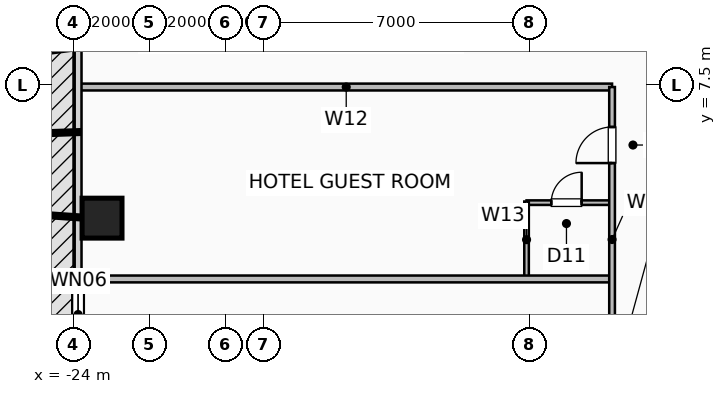
"""IFC4 building model, lengths in metres.
Left out: names, types, materials, properties, quantities, classifications, styles, units other than length and angle.
Written with IfcOpenShell. Run it as: python <this file> out.ifc"""

import sys

from ifc_helpers import new_model, si_unit, direction, frame, frame_2d, origin, origin_2d, place, context, subcontext, project, spatial, rectangle, hollow_rectangle, extrude, element, fill, save


model = new_model("IFC4")
c1 = context("Model", 3, precision=1e-05, world=origin(), true_north=direction((0.0, 1.0)))
c2 = subcontext(c1, "Body", "Model", "MODEL_VIEW")
j1 = project(units=[si_unit("LENGTHUNIT", "METRE"), si_unit("PLANEANGLEUNIT", "RADIAN")], contexts=[c1])
p1 = place(None, origin())
s1 = spatial("IfcSite", under=j1, at=p1, CompositionType="ELEMENT")
p2 = place(p1, origin())
s2 = spatial("IfcBuilding", under=s1, at=p2, CompositionType="ELEMENT")
p3 = place(p2, frame((0.0, 0.0, 27.0)))
s3 = spatial("IfcBuildingStorey", under=s2, at=p3, CompositionType="ELEMENT", Elevation=27.0)
p4 = place(p3, frame((-23.25, 4.0, 0.0), z_axis=(0.0, 0.0, 1.0), x_axis=(1.0, 0.0, 0.0)))
e1 = element("IfcColumn", 1, at=p4, inside=s3, PredefinedType="COLUMN", context=c2, shape_type="SweptSolid", body=[
    extrude(hollow_rectangle(XDim=1.05, YDim=1.05, WallThickness=0.05, at=origin_2d()), origin(), (0.0, 0.0, 1.0), 3.5),
])
p5 = place(p3, frame((-23.88, -2.4, 0.0), z_axis=(0.0, 0.0, 1.0), x_axis=(0.0, 1.0, 0.0)))
e2 = element("IfcWall", 2, at=p5, inside=s3, PredefinedType="SOLIDWALL", context=c2, shape_type="SweptSolid", body=[
    extrude(rectangle(XDim=4.8, YDim=0.3, at=frame_2d((2.4, 0.0))), origin(), (0.0, 0.0, 1.0), 3.25),
])
p6 = place(p5, frame((1.85, 0.0, 0.0)))
e3 = element("IfcOpeningElement", 3, at=p6, cuts=e2, PredefinedType="OPENING", context=c2, shape_type="SweptSolid", body=[
    extrude(rectangle(XDim=1.1, YDim=2.2, at=frame_2d((0.55, 1.1))), frame((0.0, 0.16, 0.0), z_axis=(0.0, -1.0, 0.0), x_axis=(1.0, 0.0, 0.0)), (0.0, 0.0, 1.0), 0.32),
])
p7 = place(p5, frame((0.22, 0.0, 0.85)))
e4 = element("IfcOpeningElement", 4, at=p7, cuts=e2, PredefinedType="OPENING", context=c2, shape_type="SweptSolid", body=[
    extrude(rectangle(XDim=1.43, YDim=1.8, at=frame_2d((0.715, 0.9))), frame((0.0, 0.16, 0.0), z_axis=(0.0, -1.0, 0.0), x_axis=(1.0, 0.0, 0.0)), (0.0, 0.0, 1.0), 0.32),
])
p8 = place(p5, frame((3.15, 0.0, 0.85)))
e5 = element("IfcOpeningElement", 5, at=p8, cuts=e2, PredefinedType="OPENING", context=c2, shape_type="SweptSolid", body=[
    extrude(rectangle(XDim=1.43, YDim=1.8, at=frame_2d((0.715, 0.9))), frame((0.0, 0.16, 0.0), z_axis=(0.0, -1.0, 0.0), x_axis=(1.0, 0.0, 0.0)), (0.0, 0.0, 1.0), 0.32),
])
p9 = place(p3, frame((-12.08, 4.408, 0.0), z_axis=(0.0, 0.0, 1.0), x_axis=(1.0, 0.0, 0.0)))
e6 = element("IfcWall", 6, at=p9, inside=s3, PredefinedType="PLUMBINGWALL", context=c2, shape_type="SweptSolid", body=[
    extrude(rectangle(XDim=2.25, YDim=0.12, at=frame_2d((1.125, 0.0))), origin(), (0.0, 0.0, 1.0), 3.25),
])
p10 = place(p9, frame((0.65, 0.0, 0.0)))
e7 = element("IfcOpeningElement", 7, at=p10, cuts=e6, PredefinedType="OPENING", context=c2, shape_type="SweptSolid", body=[
    extrude(rectangle(XDim=0.8, YDim=2.05, at=frame_2d((0.4, 1.025))), frame((0.0, 0.07, 0.0), z_axis=(0.0, -1.0, 0.0), x_axis=(1.0, 0.0, 0.0)), (0.0, 0.0, 1.0), 0.14),
])
p11 = place(p3, frame((-12.08, 2.43, 0.0), z_axis=(0.0, 0.0, 1.0), x_axis=(0.0, 1.0, 0.0)))
e8 = element("IfcWall", 8, at=p11, inside=s3, PredefinedType="PLUMBINGWALL", context=c2, shape_type="SweptSolid", body=[
    extrude(rectangle(XDim=2.008, YDim=0.12, at=frame_2d((1.004, 0.0))), origin(), (0.0, 0.0, 1.0), 3.25),
])
for number, where, z_axis, x_axis in (
    (9, (-23.82, 2.4, 0.0), (0.0, 0.0, 1.0), (1.0, 0.0, 0.0)),
    (10, (-23.82, 7.45, 0.0), (0.0, 0.0, 1.0), (1.0, 0.0, 0.0)),
):
    element("IfcWall", number, at=place(p3, frame(where, z_axis=z_axis, x_axis=x_axis)), inside=s3, PredefinedType="PARTITIONING", context=c2, shape_type="SweptSolid", body=[
        extrude(rectangle(XDim=13.99, YDim=0.18, at=frame_2d((6.995, 0.0))), origin(), (0.0, 0.0, 1.0), 3.25),
    ])
p12 = place(p3, frame((-9.83, -7.45, 0.0), z_axis=(0.0, 0.0, 1.0), x_axis=(0.0, 1.0, 0.0)))
e11 = element("IfcWall", 11, at=p12, inside=s3, PredefinedType="PARTITIONING", context=c2, shape_type="SweptSolid", body=[
    extrude(rectangle(XDim=14.9, YDim=0.15, at=frame_2d((7.45, 0.0))), origin(), (0.0, 0.0, 1.0), 3.25),
])
p13 = place(p12, frame((3.049, 0.0, 0.0)))
e12 = element("IfcOpeningElement", 12, at=p13, cuts=e11, PredefinedType="OPENING", context=c2, shape_type="SweptSolid", body=[
    extrude(rectangle(XDim=0.95, YDim=2.08, at=frame_2d((0.475, 1.04))), frame((0.0, 0.085, 0.0), z_axis=(0.0, -1.0, 0.0), x_axis=(1.0, 0.0, 0.0)), (0.0, 0.0, 1.0), 0.17),
])
p14 = place(p12, frame((7.927, 0.0, 0.0)))
e13 = element("IfcOpeningElement", 13, at=p14, cuts=e11, PredefinedType="OPENING", context=c2, shape_type="SweptSolid", body=[
    extrude(rectangle(XDim=0.95, YDim=2.08, at=frame_2d((0.475, 1.04))), frame((0.0, 0.085, 0.0), z_axis=(0.0, -1.0, 0.0), x_axis=(1.0, 0.0, 0.0)), (0.0, 0.0, 1.0), 0.17),
])
p15 = place(p12, frame((12.899, 0.0, 0.0)))
e14 = element("IfcOpeningElement", 14, at=p15, cuts=e11, PredefinedType="OPENING", context=c2, shape_type="SweptSolid", body=[
    extrude(rectangle(XDim=0.95, YDim=2.08, at=frame_2d((0.475, 1.04))), frame((0.0, 0.085, 0.0), z_axis=(0.0, -1.0, 0.0), x_axis=(1.0, 0.0, 0.0)), (0.0, 0.0, 1.0), 0.17),
])
p16 = place(p8, origin())
e15 = element("IfcWindow", 15, at=p16, inside=s3, PartitioningType="SINGLE_PANEL", PredefinedType="WINDOW", context=c2, shape_type="SweptSolid", body=[
    extrude(rectangle(XDim=1.43, YDim=1.8, at=frame_2d((0.715, 0.9))), frame((0.0, 0.03, 0.0), z_axis=(0.0, -1.0, 0.0), x_axis=(1.0, 0.0, 0.0)), (0.0, 0.0, 1.0), 0.06),
])
fill(e5, e15)
p17 = place(p10, origin())
e16 = element("IfcDoor", 16, at=p17, inside=s3, OperationType="SINGLE_SWING_RIGHT", PredefinedType="DOOR", context=c2, shape_type="SweptSolid", body=[
    extrude(rectangle(XDim=0.8, YDim=2.05, at=frame_2d((0.4, 1.025))), frame((0.0, 0.025, 0.0), z_axis=(0.0, -1.0, 0.0), x_axis=(1.0, 0.0, 0.0)), (0.0, 0.0, 1.0), 0.05),
])
fill(e7, e16)
p18 = place(p15, origin())
e17 = element("IfcDoor", 17, at=p18, inside=s3, OperationType="SINGLE_SWING_LEFT", PredefinedType="DOOR", context=c2, shape_type="SweptSolid", body=[
    extrude(rectangle(XDim=0.95, YDim=2.08, at=frame_2d((0.475, 1.04))), frame((0.0, 0.025, 0.0), z_axis=(0.0, -1.0, 0.0), x_axis=(1.0, 0.0, 0.0)), (0.0, 0.0, 1.0), 0.05),
])
fill(e14, e17)
save(model, sys.argv[1])
